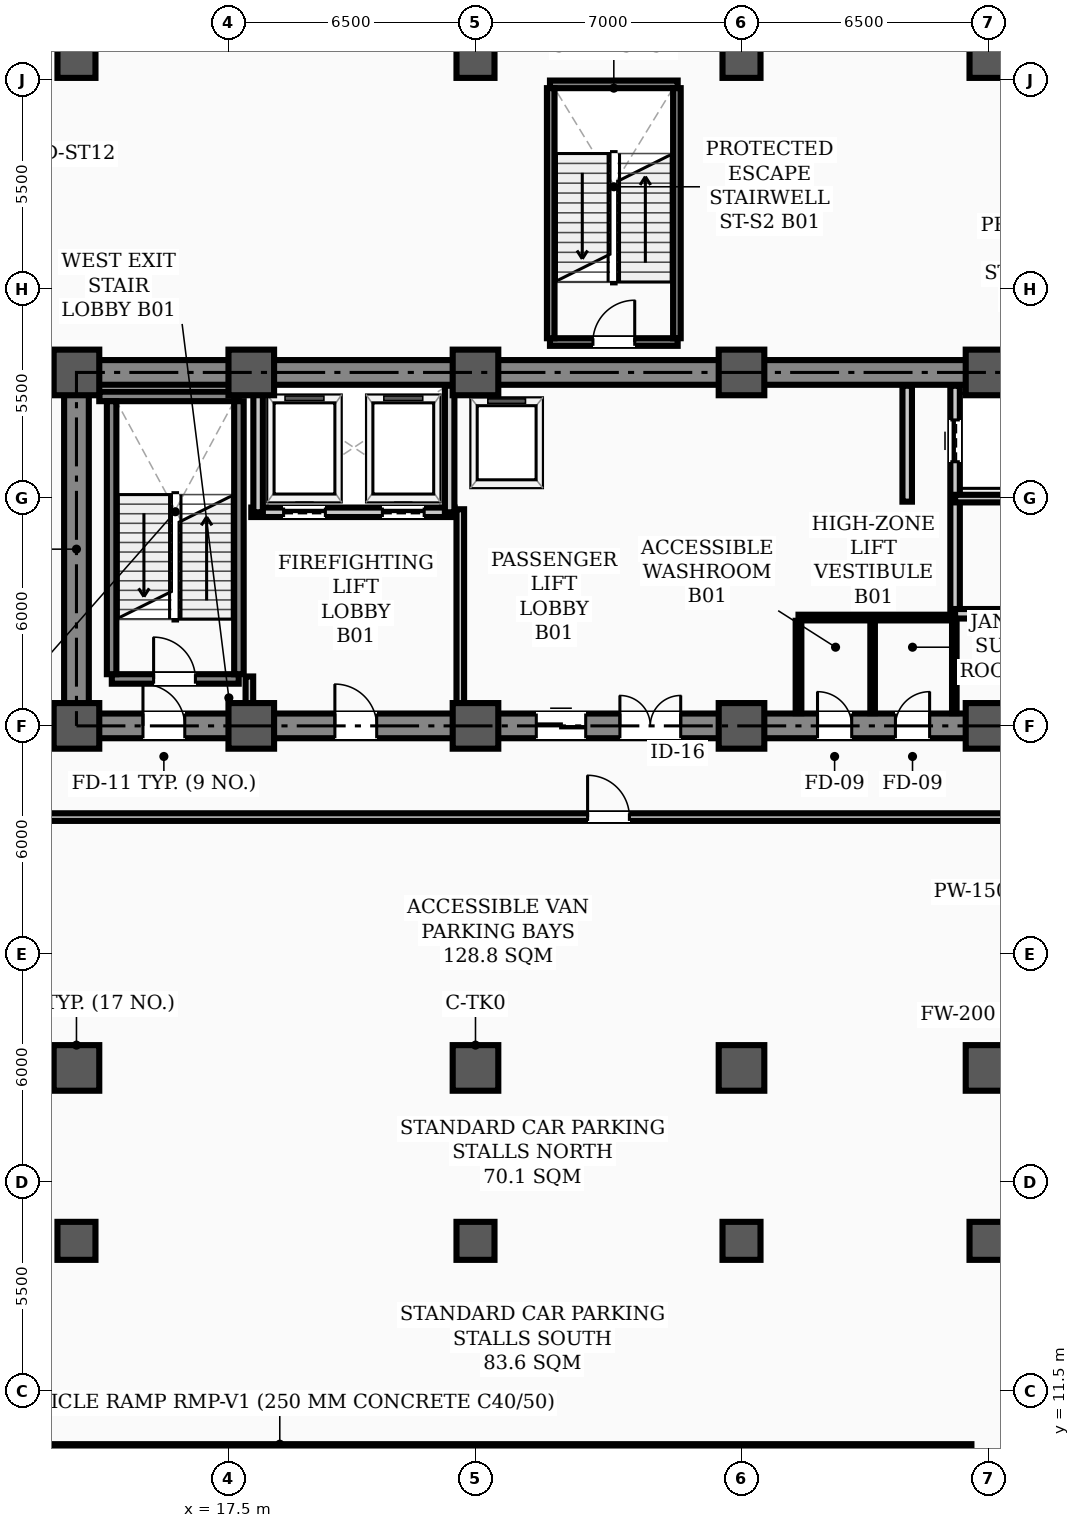
"""IFC4 building model, lengths in metres.
Left out: names, types, materials, properties, quantities, classifications, styles, units other than length and angle.
Written with IfcOpenShell. Run it as: python <this file> out.ifc"""

import sys

from ifc_helpers import new_model, si_unit, direction, frame, frame_2d, origin, origin_2d, place, context, subcontext, project, spatial, rectangle, hollow_rectangle, extrude, element, fill, save


model = new_model("IFC4")
c1 = context("Model", 3, precision=1e-05, world=origin(), true_north=direction((0.0, 1.0)))
c2 = subcontext(c1, "Body", "Model", "MODEL_VIEW")
j1 = project(units=[si_unit("LENGTHUNIT", "METRE"), si_unit("PLANEANGLEUNIT", "RADIAN")], contexts=[c1])
p1 = place(None, origin())
s1 = spatial("IfcSite", under=j1, at=p1, CompositionType="ELEMENT")
p2 = place(p1, origin())
s2 = spatial("IfcBuilding", under=s1, at=p2, CompositionType="ELEMENT")
p3 = place(p2, frame((0.0, 0.0, -5.0)))
s3 = spatial("IfcBuildingStorey", under=s2, at=p3, CompositionType="ELEMENT", Elevation=-5.0)
for number, where, z_axis, x_axis in (
    (1, (13.5, 29.0, 0.0), (0.0, 0.0, 1.0), (1.0, 0.0, 0.0)),
    (2, (13.5, 38.3, 0.0), (0.0, 0.0, 1.0), (1.0, 0.0, 0.0)),
    (3, (18.1, 29.0, 0.0), (0.0, 0.0, 1.0), (1.0, 0.0, 0.0)),
    (4, (18.1, 38.3, 0.0), (0.0, 0.0, 1.0), (1.0, 0.0, 0.0)),
    (5, (24.0, 29.0, 0.0), (0.0, 0.0, 1.0), (1.0, 0.0, 0.0)),
    (6, (24.0, 38.3, 0.0), (0.0, 0.0, 1.0), (1.0, 0.0, 0.0)),
    (7, (31.0, 29.0, 0.0), (0.0, 0.0, 1.0), (1.0, 0.0, 0.0)),
    (8, (31.0, 38.3, 0.0), (0.0, 0.0, 1.0), (1.0, 0.0, 0.0)),
    (9, (37.5, 29.0, 0.0), (0.0, 0.0, 1.0), (1.0, 0.0, 0.0)),
    (10, (37.5, 38.3, 0.0), (0.0, 0.0, 1.0), (1.0, 0.0, 0.0)),
    (11, (13.5, 20.0, 0.0), (0.0, 0.0, 1.0), (1.0, 0.0, 0.0)),
    (12, (24.0, 20.0, 0.0), (0.0, 0.0, 1.0), (1.0, 0.0, 0.0)),
    (13, (31.0, 20.0, 0.0), (0.0, 0.0, 1.0), (1.0, 0.0, 0.0)),
    (14, (37.5, 20.0, 0.0), (0.0, 0.0, 1.0), (1.0, 0.0, 0.0)),
):
    element("IfcColumn", number, at=place(p3, frame(where, z_axis=z_axis, x_axis=x_axis)), inside=s3, PredefinedType="COLUMN", context=c2, shape_type="SweptSolid", body=[
        extrude(hollow_rectangle(XDim=1.2, YDim=1.2, WallThickness=0.04, InnerFilletRadius=0.02, OuterFilletRadius=0.06, at=origin_2d()), origin(), (0.0, 0.0, 1.0), 5.0),
    ])
for number, where, z_axis, x_axis in (
    (15, (13.5, 15.45, 0.0), (0.0, 0.0, 1.0), (1.0, 0.0, 0.0)),
    (16, (13.5, 46.55, 0.0), (0.0, 0.0, 1.0), (1.0, 0.0, 0.0)),
    (17, (24.0, 15.45, 0.0), (0.0, 0.0, 1.0), (1.0, 0.0, 0.0)),
    (18, (24.0, 46.55, 0.0), (0.0, 0.0, 1.0), (1.0, 0.0, 0.0)),
    (19, (31.0, 15.45, 0.0), (0.0, 0.0, 1.0), (1.0, 0.0, 0.0)),
    (20, (31.0, 46.55, 0.0), (0.0, 0.0, 1.0), (1.0, 0.0, 0.0)),
    (21, (37.5, 15.45, 0.0), (0.0, 0.0, 1.0), (1.0, 0.0, 0.0)),
    (22, (37.5, 46.55, 0.0), (0.0, 0.0, 1.0), (1.0, 0.0, 0.0)),
):
    element("IfcColumn", number, at=place(p3, frame(where, z_axis=z_axis, x_axis=x_axis)), inside=s3, PredefinedType="COLUMN", context=c2, shape_type="SweptSolid", body=[
        extrude(rectangle(XDim=1.0, YDim=1.0, at=origin_2d()), origin(), (0.0, 0.0, 1.0), 5.0),
    ])
p4 = place(p3, frame((13.5, 29.0, 0.0), z_axis=(0.0, 0.0, 1.0), x_axis=(1.0, 0.0, 0.0)))
e23 = element("IfcWall", 23, at=p4, inside=s3, PredefinedType="SHEAR", context=c2, shape_type="SweptSolid", body=[
    extrude(rectangle(XDim=30.5, YDim=0.65, at=frame_2d((15.25, 0.0))), origin(), (0.0, 0.0, 1.0), 4.75),
])
p5 = place(p4, frame((1.75, 0.0, 0.0)))
e24 = element("IfcOpeningElement", 24, at=p5, cuts=e23, PredefinedType="OPENING", context=c2, shape_type="SweptSolid", body=[
    extrude(rectangle(XDim=1.1, YDim=2.08, at=frame_2d((0.55, 1.04))), frame((0.0, 0.335, 0.0), z_axis=(0.0, -1.0, 0.0), x_axis=(1.0, 0.0, 0.0)), (0.0, 0.0, 1.0), 0.67),
])
p6 = place(p4, frame((26.7, 0.0, 0.0)))
e25 = element("IfcOpeningElement", 25, at=p6, cuts=e23, PredefinedType="OPENING", context=c2, shape_type="SweptSolid", body=[
    extrude(rectangle(XDim=1.1, YDim=2.08, at=frame_2d((0.55, 1.04))), frame((0.0, 0.335, 0.0), z_axis=(0.0, -1.0, 0.0), x_axis=(1.0, 0.0, 0.0)), (0.0, 0.0, 1.0), 0.67),
])
p7 = place(p4, frame((6.8, 0.0, 0.0)))
e26 = element("IfcOpeningElement", 26, at=p7, cuts=e23, PredefinedType="OPENING", context=c2, shape_type="SweptSolid", body=[
    extrude(rectangle(XDim=1.1, YDim=2.08, at=frame_2d((0.55, 1.04))), frame((0.0, 0.335, 0.0), z_axis=(0.0, -1.0, 0.0), x_axis=(1.0, 0.0, 0.0)), (0.0, 0.0, 1.0), 0.67),
])
p8 = place(p4, frame((14.3, 0.0, 0.0)))
e27 = element("IfcOpeningElement", 27, at=p8, cuts=e23, PredefinedType="OPENING", context=c2, shape_type="SweptSolid", body=[
    extrude(rectangle(XDim=1.6, YDim=2.08, at=frame_2d((0.8, 1.04))), frame((0.0, 0.335, 0.0), z_axis=(0.0, -1.0, 0.0), x_axis=(1.0, 0.0, 0.0)), (0.0, 0.0, 1.0), 0.67),
])
p9 = place(p4, frame((19.5, 0.0, 0.0)))
e28 = element("IfcOpeningElement", 28, at=p9, cuts=e23, PredefinedType="OPENING", context=c2, shape_type="SweptSolid", body=[
    extrude(rectangle(XDim=0.9, YDim=2.08, at=frame_2d((0.45, 1.04))), frame((0.0, 0.335, 0.0), z_axis=(0.0, -1.0, 0.0), x_axis=(1.0, 0.0, 0.0)), (0.0, 0.0, 1.0), 0.67),
])
p10 = place(p4, frame((21.55, 0.0, 0.0)))
e29 = element("IfcOpeningElement", 29, at=p10, cuts=e23, PredefinedType="OPENING", context=c2, shape_type="SweptSolid", body=[
    extrude(rectangle(XDim=0.9, YDim=2.08, at=frame_2d((0.45, 1.04))), frame((0.0, 0.335, 0.0), z_axis=(0.0, -1.0, 0.0), x_axis=(1.0, 0.0, 0.0)), (0.0, 0.0, 1.0), 0.67),
])
p11 = place(p4, frame((12.1, 0.0, 0.0)))
e30 = element("IfcOpeningElement", 30, at=p11, cuts=e23, PredefinedType="OPENING", context=c2, shape_type="SweptSolid", body=[
    extrude(rectangle(XDim=1.3, YDim=2.08, at=frame_2d((0.65, 1.04))), frame((0.0, 0.335, 0.0), z_axis=(0.0, -1.0, 0.0), x_axis=(1.0, 0.0, 0.0)), (0.0, 0.0, 1.0), 0.67),
])
p12 = place(p3, frame((13.5, 38.3, 0.0), z_axis=(0.0, 0.0, 1.0), x_axis=(1.0, 0.0, 0.0)))
e31 = element("IfcWall", 31, at=p12, inside=s3, PredefinedType="SHEAR", context=c2, shape_type="SweptSolid", body=[
    extrude(rectangle(XDim=30.5, YDim=0.65, at=frame_2d((15.25, 0.0))), origin(), (0.0, 0.0, 1.0), 4.75),
])
p13 = place(p3, frame((13.5, 29.35, 0.0), z_axis=(0.0, 0.0, 1.0), x_axis=(0.0, 1.0, 0.0)))
e32 = element("IfcWall", 32, at=p13, inside=s3, PredefinedType="SHEAR", context=c2, shape_type="SweptSolid", body=[
    extrude(rectangle(XDim=8.6, YDim=0.65, at=frame_2d((4.3, 0.0))), origin(), (0.0, 0.0, 1.0), 4.75),
])
p14 = place(p3, frame((14.43, 30.235, 0.0), z_axis=(0.0, 0.0, 1.0), x_axis=(1.0, 0.0, 0.0)))
e33 = element("IfcWall", 33, at=p14, inside=s3, PredefinedType="STANDARD", context=c2, shape_type="SweptSolid", body=[
    extrude(rectangle(XDim=3.34, YDim=0.25, at=frame_2d((1.67, 0.0))), origin(), (0.0, 0.0, 1.0), 4.75),
])
p15 = place(p14, frame((1.1, 0.0, 0.0)))
e34 = element("IfcOpeningElement", 34, at=p15, cuts=e33, PredefinedType="OPENING", context=c2, shape_type="SweptSolid", body=[
    extrude(rectangle(XDim=1.1, YDim=2.08, at=frame_2d((0.55, 1.04))), frame((0.0, 0.135, 0.0), z_axis=(0.0, -1.0, 0.0), x_axis=(1.0, 0.0, 0.0)), (0.0, 0.0, 1.0), 0.27),
])
p16 = place(p3, frame((14.1, 37.669, 0.0), z_axis=(0.0, 0.0, 1.0), x_axis=(1.0, 0.0, 0.0)))
e35 = element("IfcWall", 35, at=p16, inside=s3, PredefinedType="STANDARD", context=c2, shape_type="SweptSolid", body=[
    extrude(rectangle(XDim=3.67, YDim=0.25, at=frame_2d((1.835, 0.0))), origin(), (0.0, 0.0, 1.0), 4.75),
])
for number, where, z_axis, x_axis in (
    (36, (14.425, 30.36, 0.0), (0.0, 0.0, 1.0), (0.0, 1.0, 0.0)),
    (37, (17.775, 30.36, 0.0), (0.0, 0.0, 1.0), (0.0, 1.0, 0.0)),
):
    element("IfcWall", number, at=place(p3, frame(where, z_axis=z_axis, x_axis=x_axis)), inside=s3, PredefinedType="STANDARD", context=c2, shape_type="SweptSolid", body=[
        extrude(rectangle(XDim=7.184, YDim=0.25, at=frame_2d((3.592, 0.0))), origin(), (0.0, 0.0, 1.0), 4.75),
    ])
p17 = place(p3, frame((18.1, 34.62, 0.0), z_axis=(0.0, 0.0, 1.0), x_axis=(1.0, 0.0, 0.0)))
e38 = element("IfcWall", 38, at=p17, inside=s3, PredefinedType="STANDARD", context=c2, shape_type="SweptSolid", body=[
    extrude(rectangle(XDim=5.35, YDim=0.25, at=frame_2d((2.675, 0.0))), origin(), (0.0, 0.0, 1.0), 4.03),
])
p18 = place(p17, frame((0.85, 0.0, 0.0)))
e39 = element("IfcOpeningElement", 39, at=p18, cuts=e38, PredefinedType="OPENING", context=c2, shape_type="SweptSolid", body=[
    extrude(rectangle(XDim=1.1, YDim=2.08, at=frame_2d((0.55, 1.04))), frame((0.0, 0.135, 0.0), z_axis=(0.0, -1.0, 0.0), x_axis=(1.0, 0.0, 0.0)), (0.0, 0.0, 1.0), 0.27),
])
p19 = place(p17, frame((3.45, 0.0, 0.0)))
e40 = element("IfcOpeningElement", 40, at=p19, cuts=e38, PredefinedType="OPENING", context=c2, shape_type="SweptSolid", body=[
    extrude(rectangle(XDim=1.1, YDim=2.08, at=frame_2d((0.55, 1.04))), frame((0.0, 0.135, 0.0), z_axis=(0.0, -1.0, 0.0), x_axis=(1.0, 0.0, 0.0)), (0.0, 0.0, 1.0), 0.27),
])
p20 = place(p3, frame((36.62, 31.95, 0.0), z_axis=(0.0, 0.0, 1.0), x_axis=(0.0, 1.0, 0.0)))
e41 = element("IfcWall", 41, at=p20, inside=s3, PredefinedType="STANDARD", context=c2, shape_type="SweptSolid", body=[
    extrude(rectangle(XDim=6.0, YDim=0.25, at=frame_2d((3.0, 0.0))), origin(), (0.0, 0.0, 1.0), 3.63),
])
p21 = place(p20, frame((4.0, 0.0, 0.0)))
e42 = element("IfcOpeningElement", 42, at=p21, cuts=e41, PredefinedType="OPENING", context=c2, shape_type="SweptSolid", body=[
    extrude(rectangle(XDim=1.1, YDim=2.08, at=frame_2d((0.55, 1.04))), frame((0.0, 0.135, 0.0), z_axis=(0.0, -1.0, 0.0), x_axis=(1.0, 0.0, 0.0)), (0.0, 0.0, 1.0), 0.27),
])
p22 = place(p3, frame((36.62, 31.95, 0.0), z_axis=(0.0, 0.0, 1.0), x_axis=(1.0, 0.0, 0.0)))
e43 = element("IfcWall", 43, at=p22, inside=s3, PredefinedType="STANDARD", context=c2, shape_type="SweptSolid", body=[
    extrude(rectangle(XDim=1.9, YDim=0.25, at=frame_2d((0.95, 0.0))), origin(), (0.0, 0.0, 1.0), 4.58),
])
for number, where, z_axis, x_axis in (
    (44, (18.28, 34.62, 0.0), (0.0, 0.0, 1.0), (0.0, 1.0, 0.0)),
    (45, (23.32, 34.62, 0.0), (0.0, 0.0, 1.0), (0.0, 1.0, 0.0)),
):
    element("IfcWall", number, at=place(p3, frame(where, z_axis=z_axis, x_axis=x_axis)), inside=s3, PredefinedType="STANDARD", context=c2, shape_type="SweptSolid", body=[
        extrude(rectangle(XDim=3.33, YDim=0.25, at=frame_2d((1.665, 0.0))), origin(), (0.0, 0.0, 1.0), 3.63),
    ])
p23 = place(p3, frame((35.36, 34.9, 0.0), z_axis=(0.0, 0.0, 1.0), x_axis=(0.0, 1.0, 0.0)))
e46 = element("IfcWall", 46, at=p23, inside=s3, PredefinedType="STANDARD", context=c2, shape_type="SweptSolid", body=[
    extrude(rectangle(XDim=3.05, YDim=0.25, at=frame_2d((1.525, 0.0))), origin(), (0.0, 0.0, 1.0), 3.63),
])
p24 = place(p3, frame((25.96, 39.1, 0.0), z_axis=(0.0, 0.0, 1.0), x_axis=(1.0, 0.0, 0.0)))
e47 = element("IfcWall", 47, at=p24, inside=s3, PredefinedType="STANDARD", context=c2, shape_type="SweptSolid", body=[
    extrude(rectangle(XDim=3.36, YDim=0.2, at=frame_2d((1.68, 0.0))), origin(), (0.0, 0.0, 1.0), 4.75),
])
p25 = place(p24, frame((1.13, 0.0, 0.0)))
e48 = element("IfcOpeningElement", 48, at=p25, cuts=e47, PredefinedType="OPENING", context=c2, shape_type="SweptSolid", body=[
    extrude(rectangle(XDim=1.1, YDim=2.08, at=frame_2d((0.55, 1.04))), frame((0.0, 0.11, 0.0), z_axis=(0.0, -1.0, 0.0), x_axis=(1.0, 0.0, 0.0)), (0.0, 0.0, 1.0), 0.22),
])
p26 = place(p3, frame((25.96, 45.88, 0.0), z_axis=(0.0, 0.0, 1.0), x_axis=(1.0, 0.0, 0.0)))
e49 = element("IfcWall", 49, at=p26, inside=s3, PredefinedType="STANDARD", context=c2, shape_type="SweptSolid", body=[
    extrude(rectangle(XDim=3.36, YDim=0.2, at=frame_2d((1.68, 0.0))), origin(), (0.0, 0.0, 1.0), 4.75),
])
for number, where, z_axis, x_axis in (
    (50, (25.98, 39.2, 0.0), (0.0, 0.0, 1.0), (0.0, 1.0, 0.0)),
    (51, (29.3, 39.2, 0.0), (0.0, 0.0, 1.0), (0.0, 1.0, 0.0)),
):
    element("IfcWall", number, at=place(p3, frame(where, z_axis=z_axis, x_axis=x_axis)), inside=s3, PredefinedType="STANDARD", context=c2, shape_type="SweptSolid", body=[
        extrude(rectangle(XDim=6.58, YDim=0.2, at=frame_2d((3.29, 0.0))), origin(), (0.0, 0.0, 1.0), 4.75),
    ])
p27 = place(p3, frame((0.4, 26.6, 0.0), z_axis=(0.0, 0.0, 1.0), x_axis=(1.0, 0.0, 0.0)))
e52 = element("IfcWall", 52, at=p27, inside=s3, PredefinedType="STANDARD", context=c2, shape_type="SweptSolid", body=[
    extrude(rectangle(XDim=76.8, YDim=0.2, at=frame_2d((38.4, 0.0))), origin(), (0.0, 0.0, 1.0), 4.03),
])
p28 = place(p27, frame((26.55, 0.0, 0.0)))
e53 = element("IfcOpeningElement", 53, at=p28, cuts=e52, PredefinedType="OPENING", context=c2, shape_type="SweptSolid", body=[
    extrude(rectangle(XDim=1.1, YDim=2.08, at=frame_2d((0.55, 1.04))), frame((0.0, 0.11, 0.0), z_axis=(0.0, -1.0, 0.0), x_axis=(1.0, 0.0, 0.0)), (0.0, 0.0, 1.0), 0.22),
])
p29 = place(p27, frame((39.875, 0.0, 0.0)))
e54 = element("IfcOpeningElement", 54, at=p29, cuts=e52, PredefinedType="OPENING", context=c2, shape_type="SweptSolid", body=[
    extrude(rectangle(XDim=0.95, YDim=2.08, at=frame_2d((0.475, 1.04))), frame((0.0, 0.11, 0.0), z_axis=(0.0, -1.0, 0.0), x_axis=(1.0, 0.0, 0.0)), (0.0, 0.0, 1.0), 0.22),
])
p30 = place(p27, frame((52.7, 0.0, 0.0)))
e55 = element("IfcOpeningElement", 55, at=p30, cuts=e52, PredefinedType="OPENING", context=c2, shape_type="SweptSolid", body=[
    extrude(rectangle(XDim=1.8, YDim=2.08, at=frame_2d((0.9, 1.04))), frame((0.0, 0.11, 0.0), z_axis=(0.0, -1.0, 0.0), x_axis=(1.0, 0.0, 0.0)), (0.0, 0.0, 1.0), 0.22),
])
p31 = place(p3, frame((32.5, 31.85, 0.0), z_axis=(0.0, 0.0, 1.0), x_axis=(1.0, 0.0, 0.0)))
e56 = element("IfcWall", 56, at=p31, inside=s3, PredefinedType="PARTITIONING", context=c2, shape_type="SweptSolid", body=[
    extrude(rectangle(XDim=4.1, YDim=0.15, at=frame_2d((2.05, 0.0))), origin(), (0.0, 0.0, 1.0), 4.28),
])
p32 = place(p3, frame((18.05, 29.335, 0.0), z_axis=(0.0, 0.0, 1.0), x_axis=(0.0, 1.0, 0.0)))
e57 = element("IfcWall", 57, at=p32, inside=s3, PredefinedType="STANDARD", context=c2, shape_type="SweptSolid", body=[
    extrude(rectangle(XDim=0.965, YDim=0.2, at=frame_2d((0.482, 0.0))), origin(), (0.0, 0.0, 1.0), 3.63),
])
p33 = place(p3, frame((23.6, 29.335, 0.0), z_axis=(0.0, 0.0, 1.0), x_axis=(0.0, 1.0, 0.0)))
e58 = element("IfcWall", 58, at=p33, inside=s3, PredefinedType="STANDARD", context=c2, shape_type="SweptSolid", body=[
    extrude(rectangle(XDim=5.365, YDim=0.2, at=frame_2d((2.683, 0.0))), origin(), (0.0, 0.0, 1.0), 3.63),
])
p34 = place(p3, frame((32.5, 29.335, 0.0), z_axis=(0.0, 0.0, 1.0), x_axis=(0.0, 1.0, 0.0)))
e59 = element("IfcWall", 59, at=p34, inside=s3, PredefinedType="PARTITIONING", context=c2, shape_type="SweptSolid", body=[
    extrude(rectangle(XDim=2.43, YDim=0.15, at=frame_2d((1.215, 0.0))), origin(), (0.0, 0.0, 1.0), 3.63),
])
for number, where, z_axis, x_axis in (
    (60, (36.6, 29.335, 0.0), (0.0, 0.0, 1.0), (0.0, 1.0, 0.0)),
    (61, (34.45, 29.335, 0.0), (0.0, 0.0, 1.0), (0.0, 1.0, 0.0)),
):
    element("IfcWall", number, at=place(p3, frame(where, z_axis=z_axis, x_axis=x_axis)), inside=s3, PredefinedType="PARTITIONING", context=c2, shape_type="SweptSolid", body=[
        extrude(rectangle(XDim=2.43, YDim=0.12, at=frame_2d((1.215, 0.0))), origin(), (0.0, 0.0, 1.0), 3.63),
    ])
p35 = place(p3, frame((36.62, 34.98, 0.0), z_axis=(0.0, 0.0, 1.0), x_axis=(1.0, 0.0, 0.0)))
e62 = element("IfcWall", 62, at=p35, inside=s3, PredefinedType="STANDARD", context=c2, shape_type="SweptSolid", body=[
    extrude(rectangle(XDim=1.9, YDim=0.2, at=frame_2d((0.95, 0.0))), origin(), (0.0, 0.0, 1.0), 4.75),
])
p36 = place(p15, origin())
e63 = element("IfcDoor", 63, at=p36, inside=s3, OperationType="SINGLE_SWING_LEFT", PredefinedType="DOOR", context=c2, shape_type="SweptSolid", body=[
    extrude(rectangle(XDim=1.1, YDim=2.08, at=frame_2d((0.55, 1.04))), frame((0.0, 0.025, 0.0), z_axis=(0.0, -1.0, 0.0), x_axis=(1.0, 0.0, 0.0)), (0.0, 0.0, 1.0), 0.05),
])
fill(e34, e63)
p37 = place(p25, origin())
e64 = element("IfcDoor", 64, at=p37, inside=s3, OperationType="SINGLE_SWING_RIGHT", PredefinedType="DOOR", context=c2, shape_type="SweptSolid", body=[
    extrude(rectangle(XDim=1.1, YDim=2.08, at=frame_2d((0.55, 1.04))), frame((0.0, 0.025, 0.0), z_axis=(0.0, -1.0, 0.0), x_axis=(1.0, 0.0, 0.0)), (0.0, 0.0, 1.0), 0.05),
])
fill(e48, e64)
p38 = place(p28, origin())
e65 = element("IfcDoor", 65, at=p38, inside=s3, OperationType="SINGLE_SWING_LEFT", PredefinedType="DOOR", context=c2, shape_type="SweptSolid", body=[
    extrude(rectangle(XDim=1.1, YDim=2.08, at=frame_2d((0.55, 1.04))), frame((0.0, 0.025, 0.0), z_axis=(0.0, -1.0, 0.0), x_axis=(1.0, 0.0, 0.0)), (0.0, 0.0, 1.0), 0.05),
])
fill(e53, e65)
p39 = place(p5, origin())
e66 = element("IfcDoor", 66, at=p39, inside=s3, OperationType="SINGLE_SWING_LEFT", PredefinedType="DOOR", context=c2, shape_type="SweptSolid", body=[
    extrude(rectangle(XDim=1.1, YDim=2.08, at=frame_2d((0.55, 1.04))), frame((0.0, 0.025, 0.0), z_axis=(0.0, -1.0, 0.0), x_axis=(1.0, 0.0, 0.0)), (0.0, 0.0, 1.0), 0.05),
])
fill(e24, e66)
p40 = place(p7, origin())
e67 = element("IfcDoor", 67, at=p40, inside=s3, OperationType="SINGLE_SWING_LEFT", PredefinedType="DOOR", context=c2, shape_type="SweptSolid", body=[
    extrude(rectangle(XDim=1.1, YDim=2.08, at=frame_2d((0.55, 1.04))), frame((0.0, 0.025, 0.0), z_axis=(0.0, -1.0, 0.0), x_axis=(1.0, 0.0, 0.0)), (0.0, 0.0, 1.0), 0.05),
])
fill(e26, e67)
p41 = place(p8, origin())
e68 = element("IfcDoor", 68, at=p41, inside=s3, OperationType="DOUBLE_DOOR_SINGLE_SWING", PredefinedType="DOOR", context=c2, shape_type="SweptSolid", body=[
    extrude(rectangle(XDim=1.6, YDim=2.08, at=frame_2d((0.8, 1.04))), frame((0.0, 0.025, 0.0), z_axis=(0.0, -1.0, 0.0), x_axis=(1.0, 0.0, 0.0)), (0.0, 0.0, 1.0), 0.05),
])
fill(e27, e68)
p42 = place(p9, origin())
e69 = element("IfcDoor", 69, at=p42, inside=s3, OperationType="SINGLE_SWING_LEFT", PredefinedType="DOOR", context=c2, shape_type="SweptSolid", body=[
    extrude(rectangle(XDim=0.9, YDim=2.08, at=frame_2d((0.45, 1.04))), frame((0.0, 0.025, 0.0), z_axis=(0.0, -1.0, 0.0), x_axis=(1.0, 0.0, 0.0)), (0.0, 0.0, 1.0), 0.05),
])
fill(e28, e69)
p43 = place(p10, origin())
e70 = element("IfcDoor", 70, at=p43, inside=s3, OperationType="SINGLE_SWING_RIGHT", PredefinedType="DOOR", context=c2, shape_type="SweptSolid", body=[
    extrude(rectangle(XDim=0.9, YDim=2.08, at=frame_2d((0.45, 1.04))), frame((0.0, 0.025, 0.0), z_axis=(0.0, -1.0, 0.0), x_axis=(1.0, 0.0, 0.0)), (0.0, 0.0, 1.0), 0.05),
])
fill(e29, e70)
p44 = place(p18, origin())
e71 = element("IfcDoor", 71, at=p44, inside=s3, OperationType="SLIDING_TO_LEFT", PredefinedType="DOOR", context=c2, shape_type="SweptSolid", body=[
    extrude(rectangle(XDim=1.1, YDim=2.08, at=frame_2d((0.55, 1.04))), frame((0.0, 0.025, 0.0), z_axis=(0.0, -1.0, 0.0), x_axis=(1.0, 0.0, 0.0)), (0.0, 0.0, 1.0), 0.05),
])
fill(e39, e71)
p45 = place(p19, origin())
e72 = element("IfcDoor", 72, at=p45, inside=s3, OperationType="SLIDING_TO_LEFT", PredefinedType="DOOR", context=c2, shape_type="SweptSolid", body=[
    extrude(rectangle(XDim=1.1, YDim=2.08, at=frame_2d((0.55, 1.04))), frame((0.0, 0.025, 0.0), z_axis=(0.0, -1.0, 0.0), x_axis=(1.0, 0.0, 0.0)), (0.0, 0.0, 1.0), 0.05),
])
fill(e40, e72)
p46 = place(p21, origin())
e73 = element("IfcDoor", 73, at=p46, inside=s3, OperationType="SLIDING_TO_LEFT", PredefinedType="DOOR", context=c2, shape_type="SweptSolid", body=[
    extrude(rectangle(XDim=1.1, YDim=2.08, at=frame_2d((0.55, 1.04))), frame((0.0, 0.025, 0.0), z_axis=(0.0, -1.0, 0.0), x_axis=(1.0, 0.0, 0.0)), (0.0, 0.0, 1.0), 0.05),
])
fill(e42, e73)
p47 = place(p11, origin())
e74 = element("IfcDoor", 74, at=p47, inside=s3, OperationType="DOUBLE_DOOR_SLIDING", PredefinedType="DOOR", context=c2, shape_type="SweptSolid", body=[
    extrude(rectangle(XDim=1.3, YDim=2.08, at=frame_2d((0.65, 1.04))), frame((0.0, 0.025, 0.0), z_axis=(0.0, -1.0, 0.0), x_axis=(1.0, 0.0, 0.0)), (0.0, 0.0, 1.0), 0.05),
])
fill(e30, e74)
save(model, sys.argv[1])
